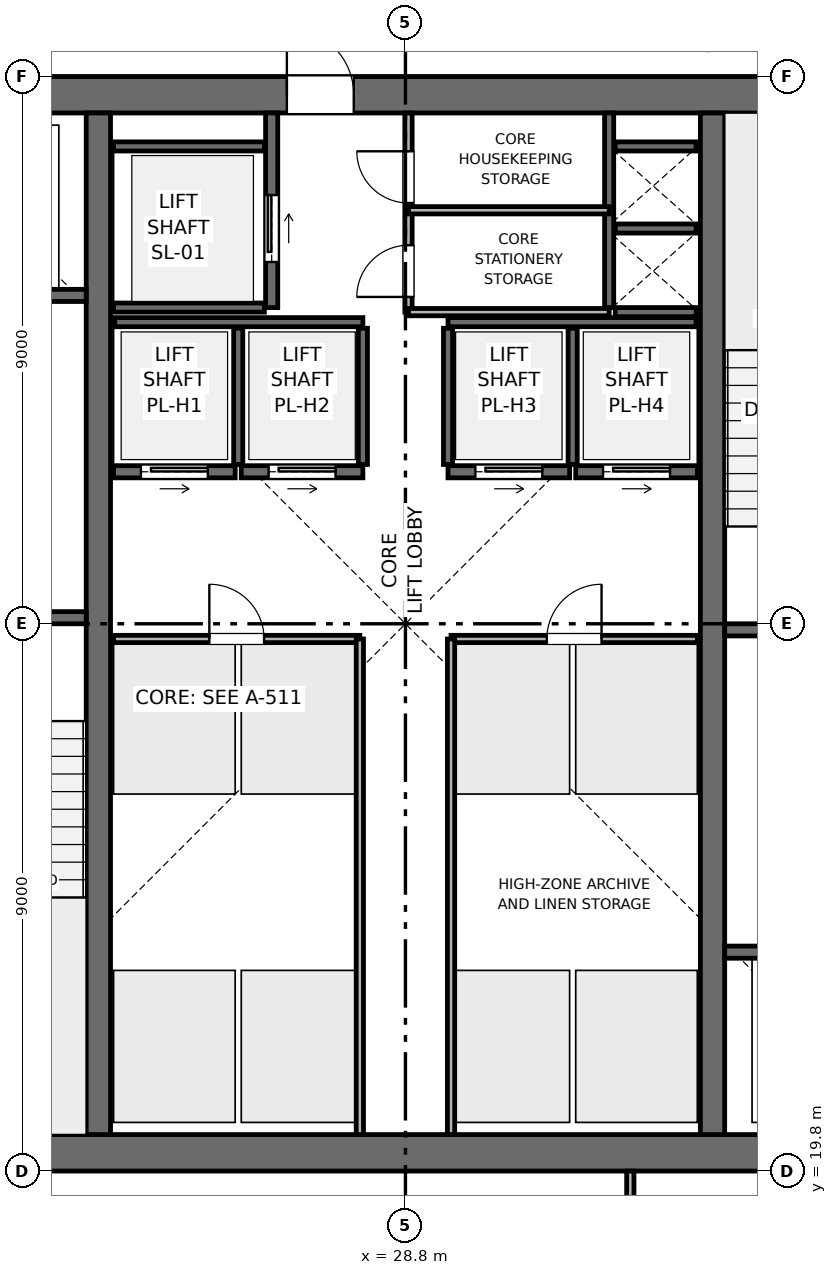
"""IFC4 building model, lengths in metres.
Left out: names, types, materials, properties, quantities, classifications, styles, units other than length and angle.
Written with IfcOpenShell. Run it as: python <this file> out.ifc"""

import sys

from ifc_helpers import new_model, si_unit, direction, frame, frame_2d, origin, place, context, subcontext, project, spatial, rectangle, extrude, element, fill, save


model = new_model("IFC4")
c1 = context("Model", 3, precision=1e-05, world=origin(), true_north=direction((0.0, 1.0)))
c2 = subcontext(c1, "Body", "Model", "MODEL_VIEW")
j1 = project(units=[si_unit("LENGTHUNIT", "METRE"), si_unit("PLANEANGLEUNIT", "RADIAN")], contexts=[c1])
p1 = place(None, origin())
s1 = spatial("IfcSite", under=j1, at=p1, CompositionType="ELEMENT")
p2 = place(p1, origin())
s2 = spatial("IfcBuilding", under=s1, at=p2, CompositionType="ELEMENT")
p3 = place(p2, frame((0.0, 0.0, 295.5)))
s3 = spatial("IfcBuildingStorey", under=s2, at=p3, CompositionType="ELEMENT", Elevation=295.5)
p4 = place(p3, frame((19.8, 20.1, 0.0), z_axis=(0.0, 0.0, 1.0), x_axis=(1.0, 0.0, 0.0)))
e1 = element("IfcWall", 1, at=p4, inside=s3, PredefinedType="SHEAR", context=c2, shape_type="SweptSolid", body=[
    extrude(rectangle(XDim=18.0, YDim=0.6, at=frame_2d((9.0, 0.0))), origin(), (0.0, 0.0, 1.0), 3.75),
])
p5 = place(p3, frame((19.8, 37.5, 0.0), z_axis=(0.0, 0.0, 1.0), x_axis=(1.0, 0.0, 0.0)))
e2 = element("IfcWall", 2, at=p5, inside=s3, PredefinedType="SHEAR", context=c2, shape_type="SweptSolid", body=[
    extrude(rectangle(XDim=18.0, YDim=0.6, at=frame_2d((9.0, 0.0))), origin(), (0.0, 0.0, 1.0), 3.75),
])
p6 = place(p5, frame((7.05, 0.0, 0.0)))
e3 = element("IfcOpeningElement", 3, at=p6, cuts=e2, PredefinedType="OPENING", context=c2, shape_type="SweptSolid", body=[
    extrude(rectangle(XDim=1.1, YDim=2.15, at=frame_2d((0.55, 1.075))), frame((0.0, 0.31, 0.0), z_axis=(0.0, -1.0, 0.0), x_axis=(1.0, 0.0, 0.0)), (0.0, 0.0, 1.0), 0.62),
])
for number, where, z_axis, x_axis in (
    (4, (23.75, 20.4, 0.0), (0.0, 0.0, 1.0), (0.0, 1.0, 0.0)),
    (5, (33.85, 20.4, 0.0), (0.0, 0.0, 1.0), (0.0, 1.0, 0.0)),
):
    element("IfcWall", number, at=place(p3, frame(where, z_axis=z_axis, x_axis=x_axis)), inside=s3, PredefinedType="SHEAR", context=c2, shape_type="SweptSolid", body=[
        extrude(rectangle(XDim=16.8, YDim=0.4, at=frame_2d((8.4, 0.0))), origin(), (0.0, 0.0, 1.0), 3.75),
    ])
p7 = place(p3, frame((20.4, 28.9, 0.0), z_axis=(0.0, 0.0, 1.0), x_axis=(1.0, 0.0, 0.0)))
e6 = element("IfcWall", 6, at=p7, inside=s3, PredefinedType="SHEAR", context=c2, shape_type="SweptSolid", body=[
    extrude(rectangle(XDim=3.15, YDim=0.2, at=frame_2d((1.575, 0.0))), origin(), (0.0, 0.0, 1.0), 3.51),
])
p8 = place(p7, frame((0.8, 0.0, 0.0)))
e7 = element("IfcOpeningElement", 7, at=p8, cuts=e6, PredefinedType="OPENING", context=c2, shape_type="SweptSolid", body=[
    extrude(rectangle(XDim=1.0, YDim=2.1, at=frame_2d((0.5, 1.05))), frame((0.0, 0.11, 0.0), z_axis=(0.0, -1.0, 0.0), x_axis=(1.0, 0.0, 0.0)), (0.0, 0.0, 1.0), 0.22),
])
p9 = place(p3, frame((34.05, 28.7, 0.0), z_axis=(0.0, 0.0, 1.0), x_axis=(1.0, 0.0, 0.0)))
e8 = element("IfcWall", 8, at=p9, inside=s3, PredefinedType="SHEAR", context=c2, shape_type="SweptSolid", body=[
    extrude(rectangle(XDim=3.15, YDim=0.2, at=frame_2d((1.575, 0.0))), origin(), (0.0, 0.0, 1.0), 3.51),
])
p10 = place(p9, frame((0.8, 0.0, 0.0)))
e9 = element("IfcOpeningElement", 9, at=p10, cuts=e8, PredefinedType="OPENING", context=c2, shape_type="SweptSolid", body=[
    extrude(rectangle(XDim=1.0, YDim=2.1, at=frame_2d((0.5, 1.05))), frame((0.0, 0.11, 0.0), z_axis=(0.0, -1.0, 0.0), x_axis=(1.0, 0.0, 0.0)), (0.0, 0.0, 1.0), 0.22),
])
p11 = place(p3, frame((32.15, 34.0, 0.0), z_axis=(0.0, 0.0, 1.0), x_axis=(0.0, 1.0, 0.0)))
e10 = element("IfcWall", 10, at=p11, inside=s3, PredefinedType="SHEAR", context=c2, shape_type="SweptSolid", body=[
    extrude(rectangle(XDim=3.2, YDim=0.15, at=frame_2d((1.6, 0.0))), origin(), (0.0, 0.0, 1.0), 3.51),
])
for number, where, z_axis, x_axis in (
    (11, (32.25, 33.925, 0.0), (0.0, 0.0, 1.0), (1.0, 0.0, 0.0)),
    (12, (32.25, 35.3, 0.0), (0.0, 0.0, 1.0), (1.0, 0.0, 0.0)),
):
    element("IfcWall", number, at=place(p3, frame(where, z_axis=z_axis, x_axis=x_axis)), inside=s3, PredefinedType="SHEAR", context=c2, shape_type="SweptSolid", body=[
        extrude(rectangle(XDim=1.33, YDim=0.15, at=frame_2d((0.665, 0.0))), origin(), (0.0, 0.0, 1.0), 3.51),
    ])
p12 = place(p3, frame((20.5, 34.2, 0.0), z_axis=(0.0, 0.0, 1.0), x_axis=(1.0, 0.0, 0.0)))
e13 = element("IfcWall", 13, at=p12, inside=s3, PredefinedType="SHEAR", context=c2, shape_type="SweptSolid", body=[
    extrude(rectangle(XDim=3.05, YDim=0.2, at=frame_2d((1.525, 0.0))), origin(), (0.0, 0.0, 1.0), 3.51),
])
p13 = place(p12, frame((0.75, 0.0, 0.0)))
e14 = element("IfcOpeningElement", 14, at=p13, cuts=e13, PredefinedType="OPENING", context=c2, shape_type="SweptSolid", body=[
    extrude(rectangle(XDim=1.1, YDim=2.15, at=frame_2d((0.55, 1.075))), frame((0.0, 0.11, 0.0), z_axis=(0.0, -1.0, 0.0), x_axis=(1.0, 0.0, 0.0)), (0.0, 0.0, 1.0), 0.22),
])
p14 = place(p3, frame((34.05, 23.4, 0.0), z_axis=(0.0, 0.0, 1.0), x_axis=(1.0, 0.0, 0.0)))
e15 = element("IfcWall", 15, at=p14, inside=s3, PredefinedType="SHEAR", context=c2, shape_type="SweptSolid", body=[
    extrude(rectangle(XDim=3.05, YDim=0.2, at=frame_2d((1.525, 0.0))), origin(), (0.0, 0.0, 1.0), 3.51),
])
p15 = place(p14, frame((1.2, 0.0, 0.0)))
e16 = element("IfcOpeningElement", 16, at=p15, cuts=e15, PredefinedType="OPENING", context=c2, shape_type="SweptSolid", body=[
    extrude(rectangle(XDim=1.1, YDim=2.15, at=frame_2d((0.55, 1.075))), frame((0.0, 0.11, 0.0), z_axis=(0.0, -1.0, 0.0), x_axis=(1.0, 0.0, 0.0)), (0.0, 0.0, 1.0), 0.22),
])
p16 = place(p3, frame((26.6, 34.0, 0.0), z_axis=(0.0, 0.0, 1.0), x_axis=(0.0, 1.0, 0.0)))
e17 = element("IfcWall", 17, at=p16, inside=s3, PredefinedType="SHEAR", context=c2, shape_type="SweptSolid", body=[
    extrude(rectangle(XDim=3.2, YDim=0.2, at=frame_2d((1.6, 0.0))), origin(), (0.0, 0.0, 1.0), 3.51),
])
p17 = place(p16, frame((0.75, 0.0, 0.0)))
e18 = element("IfcOpeningElement", 18, at=p17, cuts=e17, PredefinedType="OPENING", context=c2, shape_type="SweptSolid", body=[
    extrude(rectangle(XDim=1.1, YDim=2.15, at=frame_2d((0.55, 1.075))), frame((0.0, 0.11, 0.0), z_axis=(0.0, -1.0, 0.0), x_axis=(1.0, 0.0, 0.0)), (0.0, 0.0, 1.0), 0.22),
])
for number, where, z_axis, x_axis in (
    (19, (24.0, 34.0, 0.0), (0.0, 0.0, 1.0), (1.0, 0.0, 0.0)),
    (20, (24.0, 36.65, 0.0), (0.0, 0.0, 1.0), (1.0, 0.0, 0.0)),
):
    element("IfcWall", number, at=place(p3, frame(where, z_axis=z_axis, x_axis=x_axis)), inside=s3, PredefinedType="SHEAR", context=c2, shape_type="SweptSolid", body=[
        extrude(rectangle(XDim=2.48, YDim=0.15, at=frame_2d((1.24, 0.0))), origin(), (0.0, 0.0, 1.0), 3.51),
    ])
p18 = place(p3, frame((24.0, 31.3, 0.0), z_axis=(0.0, 0.0, 1.0), x_axis=(1.0, 0.0, 0.0)))
e21 = element("IfcWall", 21, at=p18, inside=s3, PredefinedType="SHEAR", context=c2, shape_type="SweptSolid", body=[
    extrude(rectangle(XDim=2.0, YDim=0.2, at=frame_2d((1.0, 0.0))), origin(), (0.0, 0.0, 1.0), 3.51),
])
p19 = place(p18, frame((0.45, 0.0, 0.0)))
e22 = element("IfcOpeningElement", 22, at=p19, cuts=e21, PredefinedType="OPENING", context=c2, shape_type="SweptSolid", body=[
    extrude(rectangle(XDim=1.1, YDim=2.15, at=frame_2d((0.55, 1.075))), frame((0.0, 0.11, 0.0), z_axis=(0.0, -1.0, 0.0), x_axis=(1.0, 0.0, 0.0)), (0.0, 0.0, 1.0), 0.22),
])
p20 = place(p3, frame((26.1, 31.3, 0.0), z_axis=(0.0, 0.0, 1.0), x_axis=(1.0, 0.0, 0.0)))
e23 = element("IfcWall", 23, at=p20, inside=s3, PredefinedType="SHEAR", context=c2, shape_type="SweptSolid", body=[
    extrude(rectangle(XDim=2.0, YDim=0.2, at=frame_2d((1.0, 0.0))), origin(), (0.0, 0.0, 1.0), 3.51),
])
p21 = place(p20, frame((0.45, 0.0, 0.0)))
e24 = element("IfcOpeningElement", 24, at=p21, cuts=e23, PredefinedType="OPENING", context=c2, shape_type="SweptSolid", body=[
    extrude(rectangle(XDim=1.1, YDim=2.15, at=frame_2d((0.55, 1.075))), frame((0.0, 0.11, 0.0), z_axis=(0.0, -1.0, 0.0), x_axis=(1.0, 0.0, 0.0)), (0.0, 0.0, 1.0), 0.22),
])
p22 = place(p3, frame((29.5, 31.3, 0.0), z_axis=(0.0, 0.0, 1.0), x_axis=(1.0, 0.0, 0.0)))
e25 = element("IfcWall", 25, at=p22, inside=s3, PredefinedType="SHEAR", context=c2, shape_type="SweptSolid", body=[
    extrude(rectangle(XDim=2.0, YDim=0.2, at=frame_2d((1.0, 0.0))), origin(), (0.0, 0.0, 1.0), 3.51),
])
p23 = place(p22, frame((0.45, 0.0, 0.0)))
e26 = element("IfcOpeningElement", 26, at=p23, cuts=e25, PredefinedType="OPENING", context=c2, shape_type="SweptSolid", body=[
    extrude(rectangle(XDim=1.1, YDim=2.15, at=frame_2d((0.55, 1.075))), frame((0.0, 0.11, 0.0), z_axis=(0.0, -1.0, 0.0), x_axis=(1.0, 0.0, 0.0)), (0.0, 0.0, 1.0), 0.22),
])
p24 = place(p3, frame((31.6, 31.3, 0.0), z_axis=(0.0, 0.0, 1.0), x_axis=(1.0, 0.0, 0.0)))
e27 = element("IfcWall", 27, at=p24, inside=s3, PredefinedType="SHEAR", context=c2, shape_type="SweptSolid", body=[
    extrude(rectangle(XDim=2.0, YDim=0.2, at=frame_2d((1.0, 0.0))), origin(), (0.0, 0.0, 1.0), 3.51),
])
p25 = place(p24, frame((0.45, 0.0, 0.0)))
e28 = element("IfcOpeningElement", 28, at=p25, cuts=e27, PredefinedType="OPENING", context=c2, shape_type="SweptSolid", body=[
    extrude(rectangle(XDim=1.1, YDim=2.15, at=frame_2d((0.55, 1.075))), frame((0.0, 0.11, 0.0), z_axis=(0.0, -1.0, 0.0), x_axis=(1.0, 0.0, 0.0)), (0.0, 0.0, 1.0), 0.22),
])
p26 = place(p3, frame((32.25, 36.65, 0.0), z_axis=(0.0, 0.0, 1.0), x_axis=(1.0, 0.0, 0.0)))
e29 = element("IfcWall", 29, at=p26, inside=s3, PredefinedType="SHEAR", context=c2, shape_type="SweptSolid", body=[
    extrude(rectangle(XDim=1.33, YDim=0.15, at=frame_2d((0.665, 0.0))), origin(), (0.0, 0.0, 1.0), 3.51),
])
for number, where, z_axis, x_axis in (
    (30, (24.02, 33.76, 0.0), (0.0, 0.0, 1.0), (1.0, 0.0, 0.0)),
    (31, (29.5, 33.76, 0.0), (0.0, 0.0, 1.0), (1.0, 0.0, 0.0)),
):
    element("IfcWall", number, at=place(p3, frame(where, z_axis=z_axis, x_axis=x_axis)), inside=s3, PredefinedType="SHEAR", context=c2, shape_type="SweptSolid", body=[
        extrude(rectangle(XDim=4.08, YDim=0.15, at=frame_2d((2.04, 0.0))), origin(), (0.0, 0.0, 1.0), 3.51),
    ])
for number, where, z_axis, x_axis in (
    (32, (26.05, 31.42, 0.0), (0.0, 0.0, 1.0), (0.0, 1.0, 0.0)),
    (33, (28.1, 31.42, 0.0), (0.0, 0.0, 1.0), (0.0, 1.0, 0.0)),
    (34, (29.5, 31.42, 0.0), (0.0, 0.0, 1.0), (0.0, 1.0, 0.0)),
    (35, (31.55, 31.42, 0.0), (0.0, 0.0, 1.0), (0.0, 1.0, 0.0)),
):
    element("IfcWall", number, at=place(p3, frame(where, z_axis=z_axis, x_axis=x_axis)), inside=s3, PredefinedType="SHEAR", context=c2, shape_type="SweptSolid", body=[
        extrude(rectangle(XDim=2.24, YDim=0.15, at=frame_2d((1.12, 0.0))), origin(), (0.0, 0.0, 1.0), 3.51),
    ])
p27 = place(p3, frame((28.85, 33.925, 0.0), z_axis=(0.0, 0.0, 1.0), x_axis=(0.0, 1.0, 0.0)))
e36 = element("IfcWall", 36, at=p27, inside=s3, PredefinedType="PARTITIONING", context=c2, shape_type="SweptSolid", body=[
    extrude(rectangle(XDim=3.275, YDim=0.12, at=frame_2d((1.637, 0.0))), origin(), (0.0, 0.0, 1.0), 3.51),
])
p28 = place(p27, frame((0.25, 0.0, 0.0)))
e37 = element("IfcOpeningElement", 37, at=p28, cuts=e36, PredefinedType="OPENING", context=c2, shape_type="SweptSolid", body=[
    extrude(rectangle(XDim=0.85, YDim=2.1, at=frame_2d((0.425, 1.05))), frame((0.0, 0.07, 0.0), z_axis=(0.0, -1.0, 0.0), x_axis=(1.0, 0.0, 0.0)), (0.0, 0.0, 1.0), 0.14),
])
p29 = place(p27, frame((1.795, 0.0, 0.0)))
e38 = element("IfcOpeningElement", 38, at=p29, cuts=e36, PredefinedType="OPENING", context=c2, shape_type="SweptSolid", body=[
    extrude(rectangle(XDim=0.85, YDim=2.1, at=frame_2d((0.425, 1.05))), frame((0.0, 0.07, 0.0), z_axis=(0.0, -1.0, 0.0), x_axis=(1.0, 0.0, 0.0)), (0.0, 0.0, 1.0), 0.14),
])
for number, where, z_axis, x_axis in (
    (39, (28.85, 35.6, 0.0), (0.0, 0.0, 1.0), (1.0, 0.0, 0.0)),
    (40, (28.85, 33.925, 0.0), (0.0, 0.0, 1.0), (1.0, 0.0, 0.0)),
):
    element("IfcWall", number, at=place(p3, frame(where, z_axis=z_axis, x_axis=x_axis)), inside=s3, PredefinedType="PARTITIONING", context=c2, shape_type="SweptSolid", body=[
        extrude(rectangle(XDim=3.3, YDim=0.12, at=frame_2d((1.65, 0.0))), origin(), (0.0, 0.0, 1.0), 3.51),
    ])
p30 = place(p3, frame((24.0, 28.55, 0.0), z_axis=(0.0, 0.0, 1.0), x_axis=(1.0, 0.0, 0.0)))
e41 = element("IfcWall", 41, at=p30, inside=s3, PredefinedType="PARTITIONING", context=c2, shape_type="SweptSolid", body=[
    extrude(rectangle(XDim=4.05, YDim=0.12, at=frame_2d((2.025, 0.0))), origin(), (0.0, 0.0, 1.0), 3.51),
])
p31 = place(p30, frame((1.575, 0.0, 0.0)))
e42 = element("IfcOpeningElement", 42, at=p31, cuts=e41, PredefinedType="OPENING", context=c2, shape_type="SweptSolid", body=[
    extrude(rectangle(XDim=0.9, YDim=2.1, at=frame_2d((0.45, 1.05))), frame((0.0, 0.07, 0.0), z_axis=(0.0, -1.0, 0.0), x_axis=(1.0, 0.0, 0.0)), (0.0, 0.0, 1.0), 0.14),
])
p32 = place(p3, frame((28.05, 20.4, 0.0), z_axis=(0.0, 0.0, 1.0), x_axis=(0.0, 1.0, 0.0)))
e43 = element("IfcWall", 43, at=p32, inside=s3, PredefinedType="PARTITIONING", context=c2, shape_type="SweptSolid", body=[
    extrude(rectangle(XDim=8.15, YDim=0.12, at=frame_2d((4.075, 0.0))), origin(), (0.0, 0.0, 1.0), 3.51),
])
p33 = place(p3, frame((29.55, 28.55, 0.0), z_axis=(0.0, 0.0, 1.0), x_axis=(1.0, 0.0, 0.0)))
e44 = element("IfcWall", 44, at=p33, inside=s3, PredefinedType="PARTITIONING", context=c2, shape_type="SweptSolid", body=[
    extrude(rectangle(XDim=4.05, YDim=0.12, at=frame_2d((2.025, 0.0))), origin(), (0.0, 0.0, 1.0), 3.51),
])
p34 = place(p33, frame((1.575, 0.0, 0.0)))
e45 = element("IfcOpeningElement", 45, at=p34, cuts=e44, PredefinedType="OPENING", context=c2, shape_type="SweptSolid", body=[
    extrude(rectangle(XDim=0.9, YDim=2.1, at=frame_2d((0.45, 1.05))), frame((0.0, 0.07, 0.0), z_axis=(0.0, -1.0, 0.0), x_axis=(1.0, 0.0, 0.0)), (0.0, 0.0, 1.0), 0.14),
])
p35 = place(p3, frame((29.55, 20.4, 0.0), z_axis=(0.0, 0.0, 1.0), x_axis=(0.0, 1.0, 0.0)))
e46 = element("IfcWall", 46, at=p35, inside=s3, PredefinedType="PARTITIONING", context=c2, shape_type="SweptSolid", body=[
    extrude(rectangle(XDim=8.15, YDim=0.12, at=frame_2d((4.075, 0.0))), origin(), (0.0, 0.0, 1.0), 3.51),
])
p36 = place(p3, frame((32.498, 6.13, 0.0), z_axis=(0.0, 0.0, 1.0), x_axis=(0.0, 1.0, 0.0)))
e47 = element("IfcWall", 47, at=p36, inside=s3, PredefinedType="PARTITIONING", context=c2, shape_type="SweptSolid", body=[
    extrude(rectangle(XDim=13.67, YDim=0.12, at=frame_2d((6.835, 0.0))), origin(), (0.0, 0.0, 1.0), 3.135),
])
p37 = place(p36, frame((11.27, 0.0, 0.0)))
e48 = element("IfcOpeningElement", 48, at=p37, cuts=e47, PredefinedType="OPENING", context=c2, shape_type="SweptSolid", body=[
    extrude(rectangle(XDim=0.9, YDim=2.1, at=frame_2d((0.45, 1.05))), frame((0.0, 0.07, 0.0), z_axis=(0.0, -1.0, 0.0), x_axis=(1.0, 0.0, 0.0)), (0.0, 0.0, 1.0), 0.14),
])
p38 = place(p17, origin())
e49 = element("IfcDoor", 49, at=p38, inside=s3, OperationType="SLIDING_TO_RIGHT", PredefinedType="DOOR", context=c2, shape_type="SweptSolid", body=[
    extrude(rectangle(XDim=1.1, YDim=2.15, at=frame_2d((0.55, 1.075))), frame((0.0, 0.025, 0.0), z_axis=(0.0, -1.0, 0.0), x_axis=(1.0, 0.0, 0.0)), (0.0, 0.0, 1.0), 0.05),
])
fill(e18, e49)
p39 = place(p19, origin())
e50 = element("IfcDoor", 50, at=p39, inside=s3, OperationType="SLIDING_TO_RIGHT", PredefinedType="DOOR", context=c2, shape_type="SweptSolid", body=[
    extrude(rectangle(XDim=1.1, YDim=2.15, at=frame_2d((0.55, 1.075))), frame((0.0, 0.025, 0.0), z_axis=(0.0, -1.0, 0.0), x_axis=(1.0, 0.0, 0.0)), (0.0, 0.0, 1.0), 0.05),
])
fill(e22, e50)
p40 = place(p21, origin())
e51 = element("IfcDoor", 51, at=p40, inside=s3, OperationType="SLIDING_TO_RIGHT", PredefinedType="DOOR", context=c2, shape_type="SweptSolid", body=[
    extrude(rectangle(XDim=1.1, YDim=2.15, at=frame_2d((0.55, 1.075))), frame((0.0, 0.025, 0.0), z_axis=(0.0, -1.0, 0.0), x_axis=(1.0, 0.0, 0.0)), (0.0, 0.0, 1.0), 0.05),
])
fill(e24, e51)
p41 = place(p23, origin())
e52 = element("IfcDoor", 52, at=p41, inside=s3, OperationType="SLIDING_TO_RIGHT", PredefinedType="DOOR", context=c2, shape_type="SweptSolid", body=[
    extrude(rectangle(XDim=1.1, YDim=2.15, at=frame_2d((0.55, 1.075))), frame((0.0, 0.025, 0.0), z_axis=(0.0, -1.0, 0.0), x_axis=(1.0, 0.0, 0.0)), (0.0, 0.0, 1.0), 0.05),
])
fill(e26, e52)
p42 = place(p25, origin())
e53 = element("IfcDoor", 53, at=p42, inside=s3, OperationType="SLIDING_TO_RIGHT", PredefinedType="DOOR", context=c2, shape_type="SweptSolid", body=[
    extrude(rectangle(XDim=1.1, YDim=2.15, at=frame_2d((0.55, 1.075))), frame((0.0, 0.025, 0.0), z_axis=(0.0, -1.0, 0.0), x_axis=(1.0, 0.0, 0.0)), (0.0, 0.0, 1.0), 0.05),
])
fill(e28, e53)
p43 = place(p28, origin())
e54 = element("IfcDoor", 54, at=p43, inside=s3, OperationType="SINGLE_SWING_LEFT", PredefinedType="DOOR", context=c2, shape_type="SweptSolid", body=[
    extrude(rectangle(XDim=0.85, YDim=2.1, at=frame_2d((0.425, 1.05))), frame((0.0, 0.025, 0.0), z_axis=(0.0, -1.0, 0.0), x_axis=(1.0, 0.0, 0.0)), (0.0, 0.0, 1.0), 0.05),
])
fill(e37, e54)
p44 = place(p29, origin())
e55 = element("IfcDoor", 55, at=p44, inside=s3, OperationType="SINGLE_SWING_RIGHT", PredefinedType="DOOR", context=c2, shape_type="SweptSolid", body=[
    extrude(rectangle(XDim=0.85, YDim=2.1, at=frame_2d((0.425, 1.05))), frame((0.0, 0.025, 0.0), z_axis=(0.0, -1.0, 0.0), x_axis=(1.0, 0.0, 0.0)), (0.0, 0.0, 1.0), 0.05),
])
fill(e38, e55)
p45 = place(p31, origin())
e56 = element("IfcDoor", 56, at=p45, inside=s3, OperationType="SINGLE_SWING_LEFT", PredefinedType="DOOR", context=c2, shape_type="SweptSolid", body=[
    extrude(rectangle(XDim=0.9, YDim=2.1, at=frame_2d((0.45, 1.05))), frame((0.0, 0.025, 0.0), z_axis=(0.0, -1.0, 0.0), x_axis=(1.0, 0.0, 0.0)), (0.0, 0.0, 1.0), 0.05),
])
fill(e42, e56)
p46 = place(p34, origin())
e57 = element("IfcDoor", 57, at=p46, inside=s3, OperationType="SINGLE_SWING_RIGHT", PredefinedType="DOOR", context=c2, shape_type="SweptSolid", body=[
    extrude(rectangle(XDim=0.9, YDim=2.1, at=frame_2d((0.45, 1.05))), frame((0.0, 0.025, 0.0), z_axis=(0.0, -1.0, 0.0), x_axis=(1.0, 0.0, 0.0)), (0.0, 0.0, 1.0), 0.05),
])
fill(e45, e57)
p47 = place(p6, origin())
e58 = element("IfcDoor", 58, at=p47, inside=s3, OperationType="SINGLE_SWING_LEFT", PredefinedType="DOOR", context=c2, shape_type="SweptSolid", body=[
    extrude(rectangle(XDim=1.1, YDim=2.15, at=frame_2d((0.55, 1.075))), frame((0.0, 0.025, 0.0), z_axis=(0.0, -1.0, 0.0), x_axis=(1.0, 0.0, 0.0)), (0.0, 0.0, 1.0), 0.05),
])
fill(e3, e58)
save(model, sys.argv[1])
